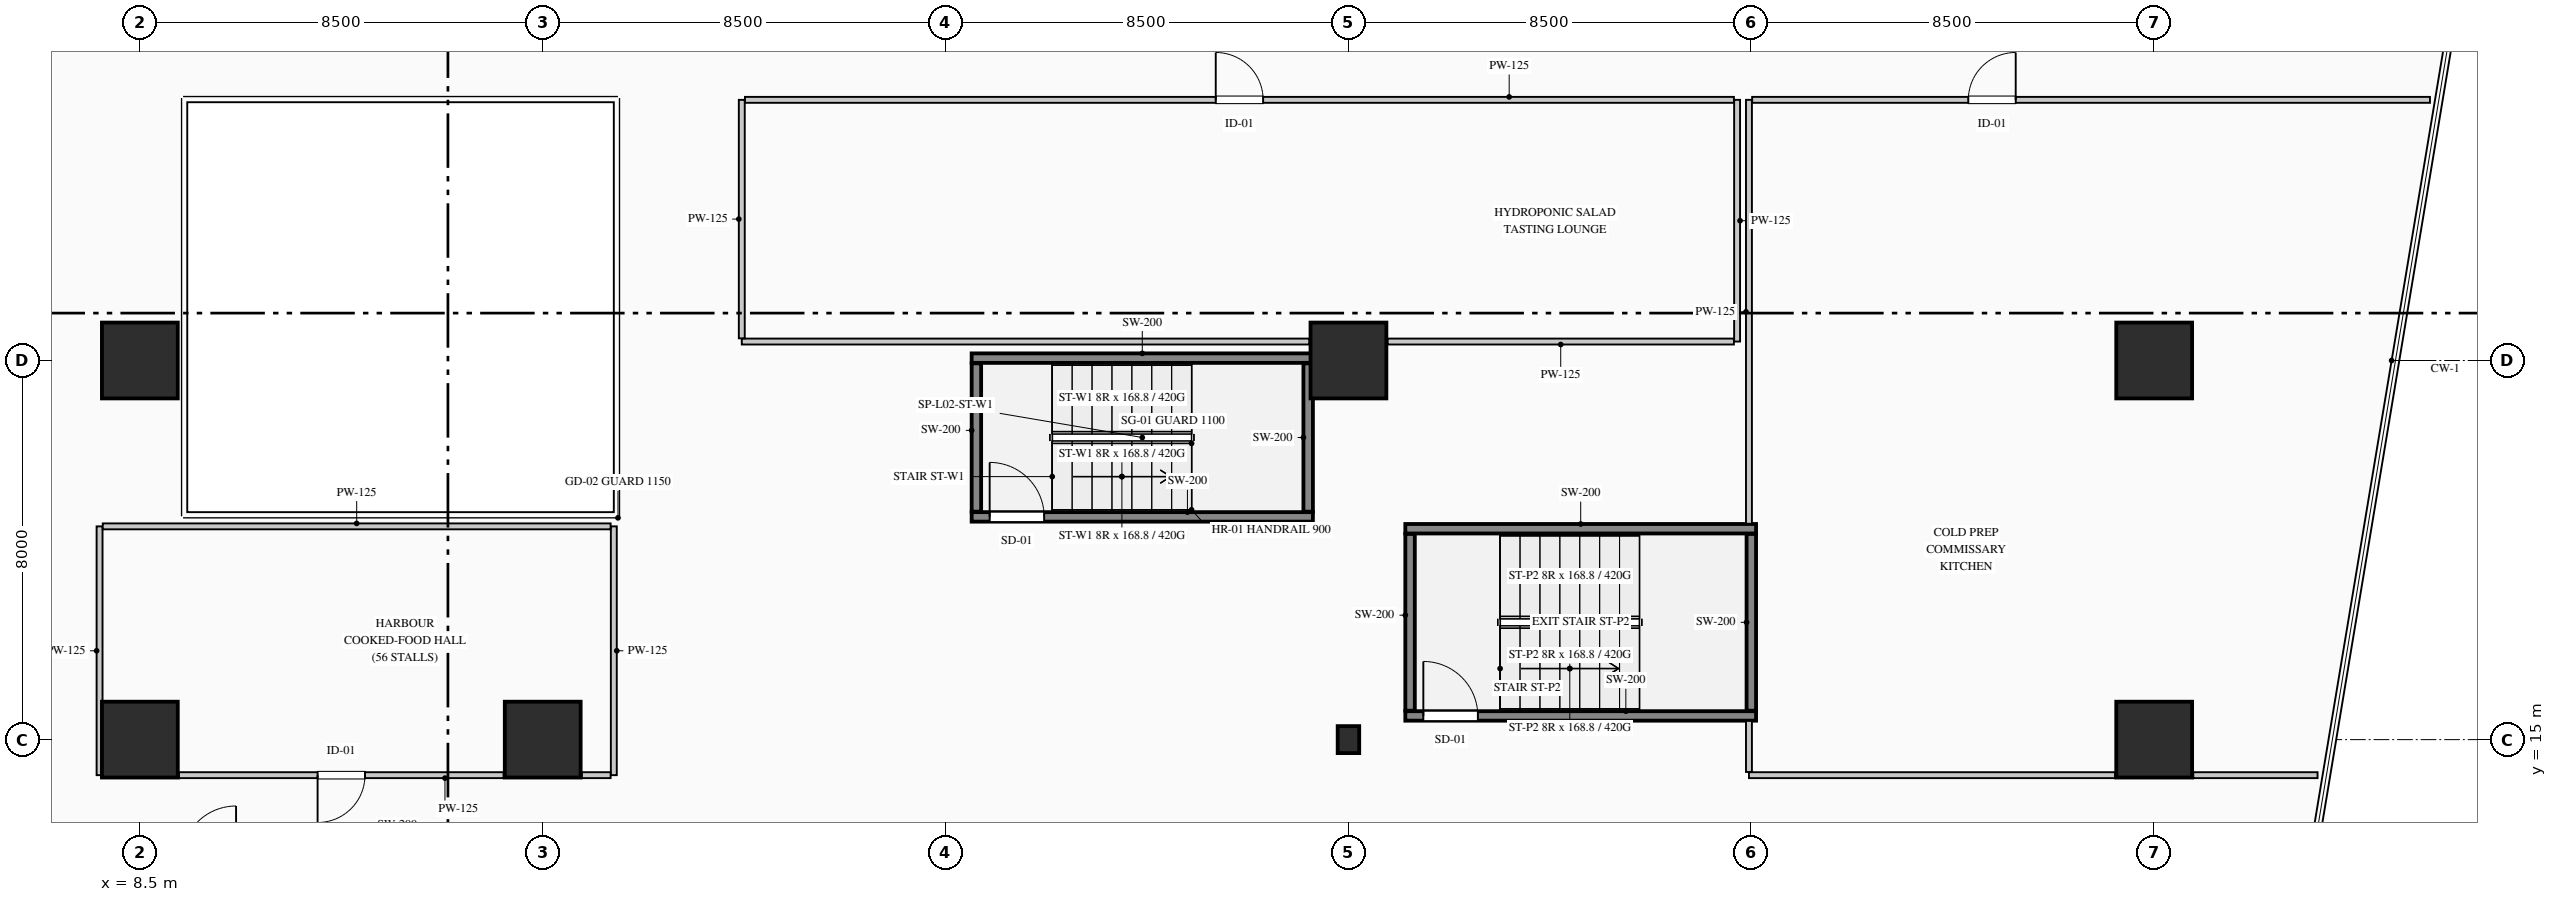
"""IFC4 building model, lengths in metres.
Left out: names, types, materials, properties, quantities, classifications, styles, units other than length and angle.
Written with IfcOpenShell. Run it as: python <this file> out.ifc"""

import sys

from ifc_helpers import new_model, si_unit, direction, frame, frame_2d, origin, origin_2d, place, context, subcontext, project, spatial, rectangle, i_section, extrude, element, fill, save


model = new_model("IFC4")
c1 = context("Model", 3, precision=1e-05, world=origin(), true_north=direction((0.0, 1.0)))
c2 = subcontext(c1, "Body", "Model", "MODEL_VIEW")
j1 = project(units=[si_unit("LENGTHUNIT", "METRE"), si_unit("PLANEANGLEUNIT", "RADIAN")], contexts=[c1])
p1 = place(None, origin())
s1 = spatial("IfcSite", under=j1, at=p1, CompositionType="ELEMENT")
p2 = place(p1, origin())
s2 = spatial("IfcBuilding", under=s1, at=p2, CompositionType="ELEMENT")
p3 = place(p2, frame((0.0, 0.0, 5.4)))
s3 = spatial("IfcBuildingStorey", under=s2, at=p3, CompositionType="ELEMENT", Elevation=5.4)
p4 = place(p3, frame((26.05, 19.7, 0.0), z_axis=(0.0, 0.0, 1.0), x_axis=(1.0, 0.0, 0.0)))
e1 = element("IfcWall", 1, at=p4, inside=s3, PredefinedType="SHEAR", context=c2, shape_type="SweptSolid", body=[
    extrude(rectangle(XDim=7.2, YDim=0.2, at=frame_2d((3.6, 0.0))), origin(), (0.0, 0.0, 1.0), 5.4),
])
p5 = place(p4, frame((0.38, 0.0, 0.0)))
e2 = element("IfcOpeningElement", 2, at=p5, cuts=e1, PredefinedType="OPENING", context=c2, shape_type="SweptSolid", body=[
    extrude(rectangle(XDim=1.15, YDim=2.2, at=frame_2d((0.575, 1.1))), frame((0.0, 0.11, 0.0), z_axis=(0.0, -1.0, 0.0), x_axis=(1.0, 0.0, 0.0)), (0.0, 0.0, 1.0), 0.22),
])
p6 = place(p3, frame((26.05, 23.05, 0.0), z_axis=(0.0, 0.0, 1.0), x_axis=(1.0, 0.0, 0.0)))
e3 = element("IfcWall", 3, at=p6, inside=s3, PredefinedType="SHEAR", context=c2, shape_type="SweptSolid", body=[
    extrude(rectangle(XDim=7.2, YDim=0.2, at=frame_2d((3.6, 0.0))), origin(), (0.0, 0.0, 1.0), 5.4),
])
for number, where, z_axis, x_axis in (
    (4, (26.15, 19.81, 0.0), (0.0, 0.0, 1.0), (0.0, 1.0, 0.0)),
    (5, (33.15, 19.81, 0.0), (0.0, 0.0, 1.0), (0.0, 1.0, 0.0)),
):
    element("IfcWall", number, at=place(p3, frame(where, z_axis=z_axis, x_axis=x_axis)), inside=s3, PredefinedType="SHEAR", context=c2, shape_type="SweptSolid", body=[
        extrude(rectangle(XDim=3.13, YDim=0.2, at=frame_2d((1.565, 0.0))), origin(), (0.0, 0.0, 1.0), 5.4),
    ])
p7 = place(p3, frame((35.2, 15.5, 0.0), z_axis=(0.0, 0.0, 1.0), x_axis=(1.0, 0.0, 0.0)))
e6 = element("IfcWall", 6, at=p7, inside=s3, PredefinedType="SHEAR", context=c2, shape_type="SweptSolid", body=[
    extrude(rectangle(XDim=7.4, YDim=0.2, at=frame_2d((3.7, 0.0))), origin(), (0.0, 0.0, 1.0), 5.4),
])
p8 = place(p7, frame((0.38, 0.0, 0.0)))
e7 = element("IfcOpeningElement", 7, at=p8, cuts=e6, PredefinedType="OPENING", context=c2, shape_type="SweptSolid", body=[
    extrude(rectangle(XDim=1.15, YDim=2.2, at=frame_2d((0.575, 1.1))), frame((0.0, 0.11, 0.0), z_axis=(0.0, -1.0, 0.0), x_axis=(1.0, 0.0, 0.0)), (0.0, 0.0, 1.0), 0.22),
])
p9 = place(p3, frame((35.2, 19.45, 0.0), z_axis=(0.0, 0.0, 1.0), x_axis=(1.0, 0.0, 0.0)))
e8 = element("IfcWall", 8, at=p9, inside=s3, PredefinedType="SHEAR", context=c2, shape_type="SweptSolid", body=[
    extrude(rectangle(XDim=7.4, YDim=0.2, at=frame_2d((3.7, 0.0))), origin(), (0.0, 0.0, 1.0), 5.4),
])
for number, where, z_axis, x_axis in (
    (9, (35.3, 15.61, 0.0), (0.0, 0.0, 1.0), (0.0, 1.0, 0.0)),
    (10, (42.5, 15.61, 0.0), (0.0, 0.0, 1.0), (0.0, 1.0, 0.0)),
):
    element("IfcWall", number, at=place(p3, frame(where, z_axis=z_axis, x_axis=x_axis)), inside=s3, PredefinedType="SHEAR", context=c2, shape_type="SweptSolid", body=[
        extrude(rectangle(XDim=3.73, YDim=0.2, at=frame_2d((1.865, 0.0))), origin(), (0.0, 0.0, 1.0), 5.4),
    ])
for number, where, z_axis, x_axis in (
    (11, (8.5, 15.0, 0.0), (0.0, 0.0, 1.0), (1.0, 0.0, 0.0)),
    (12, (8.5, 23.0, 0.0), (0.0, 0.0, 1.0), (1.0, 0.0, 0.0)),
    (13, (17.0, 15.0, 0.0), (0.0, 0.0, 1.0), (1.0, 0.0, 0.0)),
):
    element("IfcColumn", number, at=place(p3, frame(where, z_axis=z_axis, x_axis=x_axis)), inside=s3, PredefinedType="COLUMN", context=c2, shape_type="SweptSolid", body=[
        extrude(rectangle(XDim=1.6, YDim=1.6, at=origin_2d()), origin(), (0.0, 0.0, 1.0), 5.4),
    ])
p10 = place(p3, frame((34.0, 15.0, 0.0), z_axis=(0.0, 0.0, 1.0), x_axis=(1.0, 0.0, 0.0)))
e14 = element("IfcColumn", 14, at=p10, inside=s3, PredefinedType="COLUMN", context=c2, shape_type="SweptSolid", body=[
    extrude(i_section(OverallWidth=0.454, OverallDepth=0.569, WebThickness=0.078, FlangeThickness=0.08, FilletRadius=0.015, at=origin_2d()), origin(), (0.0, 0.0, 1.0), 5.4),
])
for number, where, z_axis, x_axis in (
    (15, (34.0, 23.0, 0.0), (0.0, 0.0, 1.0), (1.0, 0.0, 0.0)),
    (16, (51.0, 15.0, 0.0), (0.0, 0.0, 1.0), (1.0, 0.0, 0.0)),
    (17, (51.0, 23.0, 0.0), (0.0, 0.0, 1.0), (1.0, 0.0, 0.0)),
):
    element("IfcColumn", number, at=place(p3, frame(where, z_axis=z_axis, x_axis=x_axis)), inside=s3, PredefinedType="COLUMN", context=c2, shape_type="SweptSolid", body=[
        extrude(rectangle(XDim=1.6, YDim=1.6, at=origin_2d()), origin(), (0.0, 0.0, 1.0), 5.4),
    ])
p11 = place(p3, frame((18.5, 19.5, 0.0), z_axis=(0.0, 0.0, 1.0), x_axis=(0.0, -1.0, 0.0)))
e18 = element("IfcWall", 18, at=p11, inside=s3, PredefinedType="PARTITIONING", context=c2, shape_type="SweptSolid", body=[
    extrude(rectangle(XDim=5.25, YDim=0.125, at=frame_2d((2.625, 0.0))), origin(), (0.0, 0.0, 1.0), 4.615),
])
p12 = place(p3, frame((18.433, 14.25, 0.0), z_axis=(0.0, 0.0, 1.0), x_axis=(-1.0, 0.0, 0.0)))
e19 = element("IfcWall", 19, at=p12, inside=s3, PredefinedType="PARTITIONING", context=c2, shape_type="SweptSolid", body=[
    extrude(rectangle(XDim=0.608, YDim=0.125, at=frame_2d((0.304, 0.0))), origin(), (0.0, 0.0, 1.0), 5.08),
])
p13 = place(p3, frame((16.175, 14.25, 0.0), z_axis=(0.0, 0.0, 1.0), x_axis=(-1.0, 0.0, 0.0)))
e20 = element("IfcWall", 20, at=p13, inside=s3, PredefinedType="PARTITIONING", context=c2, shape_type="SweptSolid", body=[
    extrude(rectangle(XDim=6.85, YDim=0.125, at=frame_2d((3.425, 0.0))), origin(), (0.0, 0.0, 1.0), 4.465),
])
p14 = place(p13, frame((2.925, 0.0, 0.0)))
e21 = element("IfcOpeningElement", 21, at=p14, cuts=e20, PredefinedType="OPENING", context=c2, shape_type="SweptSolid", body=[
    extrude(rectangle(XDim=1.0, YDim=2.15, at=frame_2d((0.5, 1.075))), frame((0.0, 0.073, 0.0), z_axis=(0.0, -1.0, 0.0), x_axis=(1.0, 0.0, 0.0)), (0.0, 0.0, 1.0), 0.145),
])
p15 = place(p3, frame((7.65, 14.25, 0.0), z_axis=(0.0, 0.0, 1.0), x_axis=(0.0, 1.0, 0.0)))
e22 = element("IfcWall", 22, at=p15, inside=s3, PredefinedType="PARTITIONING", context=c2, shape_type="SweptSolid", body=[
    extrude(rectangle(XDim=5.25, YDim=0.125, at=frame_2d((2.625, 0.0))), origin(), (0.0, 0.0, 1.0), 5.08),
])
p16 = place(p3, frame((7.718, 19.5, 0.0), z_axis=(0.0, 0.0, 1.0), x_axis=(1.0, 0.0, 0.0)))
e23 = element("IfcWall", 23, at=p16, inside=s3, PredefinedType="PARTITIONING", context=c2, shape_type="SweptSolid", body=[
    extrude(rectangle(XDim=10.715, YDim=0.125, at=frame_2d((5.357, 0.0))), origin(), (0.0, 0.0, 1.0), 5.08),
])
p17 = place(p3, frame((42.2, 28.5, 0.0), z_axis=(0.0, 0.0, 1.0), x_axis=(0.0, -1.0, 0.0)))
e24 = element("IfcWall", 24, at=p17, inside=s3, PredefinedType="PARTITIONING", context=c2, shape_type="SweptSolid", body=[
    extrude(rectangle(XDim=5.1, YDim=0.125, at=frame_2d((2.55, 0.0))), origin(), (0.0, 0.0, 1.0), 5.08),
])
p18 = place(p3, frame((42.133, 23.4, 0.0), z_axis=(0.0, 0.0, 1.0), x_axis=(-1.0, 0.0, 0.0)))
e25 = element("IfcWall", 25, at=p18, inside=s3, PredefinedType="PARTITIONING", context=c2, shape_type="SweptSolid", body=[
    extrude(rectangle(XDim=7.308, YDim=0.125, at=frame_2d((3.654, 0.0))), origin(), (0.0, 0.0, 1.0), 5.08),
])
p19 = place(p3, frame((33.175, 23.4, 0.0), z_axis=(0.0, 0.0, 1.0), x_axis=(-1.0, 0.0, 0.0)))
e26 = element("IfcWall", 26, at=p19, inside=s3, PredefinedType="PARTITIONING", context=c2, shape_type="SweptSolid", body=[
    extrude(rectangle(XDim=11.975, YDim=0.125, at=frame_2d((5.988, 0.0))), origin(), (0.0, 0.0, 1.0), 5.08),
])
p20 = place(p3, frame((21.2, 23.468, 0.0), z_axis=(0.0, 0.0, 1.0), x_axis=(0.0, 1.0, 0.0)))
e27 = element("IfcWall", 27, at=p20, inside=s3, PredefinedType="PARTITIONING", context=c2, shape_type="SweptSolid", body=[
    extrude(rectangle(XDim=5.032, YDim=0.125, at=frame_2d((2.516, 0.0))), origin(), (0.0, 0.0, 1.0), 5.08),
])
p21 = place(p3, frame((21.268, 28.5, 0.0), z_axis=(0.0, 0.0, 1.0), x_axis=(1.0, 0.0, 0.0)))
e28 = element("IfcWall", 28, at=p21, inside=s3, PredefinedType="PARTITIONING", context=c2, shape_type="SweptSolid", body=[
    extrude(rectangle(XDim=20.865, YDim=0.125, at=frame_2d((10.433, 0.0))), origin(), (0.0, 0.0, 1.0), 5.08),
])
p22 = place(p21, frame((9.933, 0.0, 0.0)))
e29 = element("IfcOpeningElement", 29, at=p22, cuts=e28, PredefinedType="OPENING", context=c2, shape_type="SweptSolid", body=[
    extrude(rectangle(XDim=1.0, YDim=2.15, at=frame_2d((0.5, 1.075))), frame((0.0, 0.073, 0.0), z_axis=(0.0, -1.0, 0.0), x_axis=(1.0, 0.0, 0.0)), (0.0, 0.0, 1.0), 0.145),
])
p23 = place(p3, frame((42.45, 19.555, 0.0), z_axis=(0.0, 0.0, 1.0), x_axis=(0.0, 1.0, 0.0)))
e30 = element("IfcWall", 30, at=p23, inside=s3, PredefinedType="PARTITIONING", context=c2, shape_type="SweptSolid", body=[
    extrude(rectangle(XDim=8.945, YDim=0.125, at=frame_2d((4.473, 0.0))), origin(), (0.0, 0.0, 1.0), 5.08),
])
p24 = place(p3, frame((42.518, 28.5, 0.0), z_axis=(0.0, 0.0, 1.0), x_axis=(1.0, 0.0, 0.0)))
e31 = element("IfcWall", 31, at=p24, inside=s3, PredefinedType="PARTITIONING", context=c2, shape_type="SweptSolid", body=[
    extrude(rectangle(XDim=14.301, YDim=0.125, at=frame_2d((7.15, 0.0))), origin(), (0.0, 0.0, 1.0), 5.08),
])
p25 = place(p24, frame((4.561, 0.0, 0.0)))
e32 = element("IfcOpeningElement", 32, at=p25, cuts=e31, PredefinedType="OPENING", context=c2, shape_type="SweptSolid", body=[
    extrude(rectangle(XDim=1.0, YDim=2.15, at=frame_2d((0.5, 1.075))), frame((0.0, 0.073, 0.0), z_axis=(0.0, -1.0, 0.0), x_axis=(1.0, 0.0, 0.0)), (0.0, 0.0, 1.0), 0.145),
])
p26 = place(p3, frame((54.447, 14.25, 0.0), z_axis=(0.0, 0.0, 1.0), x_axis=(-1.0, 0.0, 0.0)))
e33 = element("IfcWall", 33, at=p26, inside=s3, PredefinedType="PARTITIONING", context=c2, shape_type="SweptSolid", body=[
    extrude(rectangle(XDim=2.622, YDim=0.125, at=frame_2d((1.311, 0.0))), origin(), (0.0, 0.0, 1.0), 5.08),
])
p27 = place(p3, frame((50.175, 14.25, 0.0), z_axis=(0.0, 0.0, 1.0), x_axis=(-1.0, 0.0, 0.0)))
e34 = element("IfcWall", 34, at=p27, inside=s3, PredefinedType="PARTITIONING", context=c2, shape_type="SweptSolid", body=[
    extrude(rectangle(XDim=7.725, YDim=0.125, at=frame_2d((3.863, 0.0))), origin(), (0.0, 0.0, 1.0), 5.08),
])
p28 = place(p3, frame((42.45, 14.317, 0.0), z_axis=(0.0, 0.0, 1.0), x_axis=(0.0, 1.0, 0.0)))
e35 = element("IfcWall", 35, at=p28, inside=s3, PredefinedType="PARTITIONING", context=c2, shape_type="SweptSolid", body=[
    extrude(rectangle(XDim=1.078, YDim=0.125, at=frame_2d((0.539, 0.0))), origin(), (0.0, 0.0, 1.0), 5.08),
])
p29 = place(p5, origin())
e36 = element("IfcDoor", 36, at=p29, inside=s3, OperationType="SINGLE_SWING_LEFT", PredefinedType="DOOR", context=c2, shape_type="SweptSolid", body=[
    extrude(rectangle(XDim=1.15, YDim=2.2, at=frame_2d((0.575, 1.1))), frame((0.0, 0.025, 0.0), z_axis=(0.0, -1.0, 0.0), x_axis=(1.0, 0.0, 0.0)), (0.0, 0.0, 1.0), 0.05),
])
fill(e2, e36)
p30 = place(p8, origin())
e37 = element("IfcDoor", 37, at=p30, inside=s3, OperationType="SINGLE_SWING_LEFT", PredefinedType="DOOR", context=c2, shape_type="SweptSolid", body=[
    extrude(rectangle(XDim=1.15, YDim=2.2, at=frame_2d((0.575, 1.1))), frame((0.0, 0.025, 0.0), z_axis=(0.0, -1.0, 0.0), x_axis=(1.0, 0.0, 0.0)), (0.0, 0.0, 1.0), 0.05),
])
fill(e7, e37)
p31 = place(p14, origin())
e38 = element("IfcDoor", 38, at=p31, inside=s3, OperationType="SINGLE_SWING_RIGHT", PredefinedType="DOOR", context=c2, shape_type="SweptSolid", body=[
    extrude(rectangle(XDim=1.0, YDim=2.15, at=frame_2d((0.5, 1.075))), frame((0.0, 0.025, 0.0), z_axis=(0.0, -1.0, 0.0), x_axis=(1.0, 0.0, 0.0)), (0.0, 0.0, 1.0), 0.05),
])
fill(e21, e38)
p32 = place(p22, origin())
e39 = element("IfcDoor", 39, at=p32, inside=s3, OperationType="SINGLE_SWING_LEFT", PredefinedType="DOOR", context=c2, shape_type="SweptSolid", body=[
    extrude(rectangle(XDim=1.0, YDim=2.15, at=frame_2d((0.5, 1.075))), frame((0.0, 0.025, 0.0), z_axis=(0.0, -1.0, 0.0), x_axis=(1.0, 0.0, 0.0)), (0.0, 0.0, 1.0), 0.05),
])
fill(e29, e39)
p33 = place(p25, origin())
e40 = element("IfcDoor", 40, at=p33, inside=s3, OperationType="SINGLE_SWING_RIGHT", PredefinedType="DOOR", context=c2, shape_type="SweptSolid", body=[
    extrude(rectangle(XDim=1.0, YDim=2.15, at=frame_2d((0.5, 1.075))), frame((0.0, 0.025, 0.0), z_axis=(0.0, -1.0, 0.0), x_axis=(1.0, 0.0, 0.0)), (0.0, 0.0, 1.0), 0.05),
])
fill(e32, e40)
save(model, sys.argv[1])
